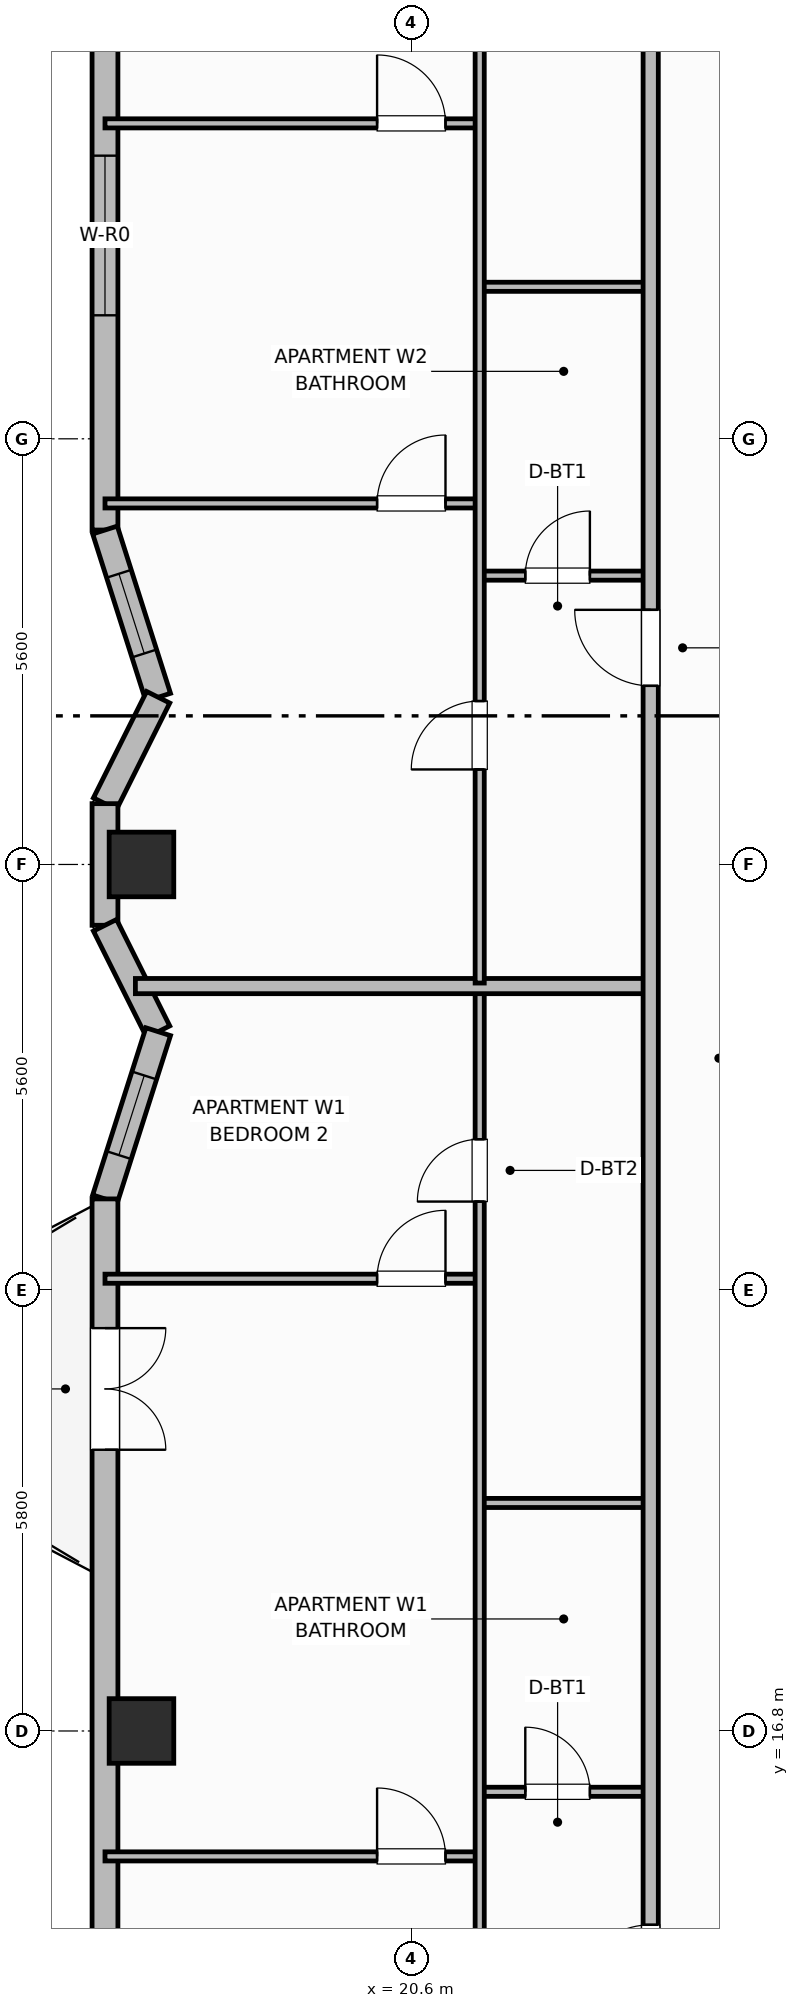
"""IFC4 building model, lengths in metres.
Left out: names, types, materials, properties, quantities, classifications, styles, units other than length and angle.
Written with IfcOpenShell. Run it as: python <this file> out.ifc"""

import sys

from ifc_helpers import new_model, si_unit, direction, frame, frame_2d, origin, origin_2d, place, context, subcontext, project, spatial, rectangle, extrude, element, fill, save


model = new_model("IFC4")
c1 = context("Model", 3, precision=1e-05, world=origin(), true_north=direction((0.0, 1.0)))
c2 = subcontext(c1, "Body", "Model", "MODEL_VIEW")
j1 = project(units=[si_unit("LENGTHUNIT", "METRE"), si_unit("PLANEANGLEUNIT", "RADIAN")], contexts=[c1])
p1 = place(None, origin())
s1 = spatial("IfcSite", under=j1, at=p1, CompositionType="ELEMENT")
p2 = place(p1, origin())
s2 = spatial("IfcBuilding", under=s1, at=p2, CompositionType="ELEMENT")
p3 = place(p2, frame((0.0, 0.0, 203.1)))
s3 = spatial("IfcBuildingStorey", under=s2, at=p3, CompositionType="ELEMENT", Elevation=203.1)
for number, where, z_axis, x_axis in (
    (1, (17.05, 16.8, 0.0), (0.0, 0.0, 1.0), (1.0, 0.0, 0.0)),
    (2, (17.05, 28.2, 0.0), (0.0, 0.0, 1.0), (1.0, 0.0, 0.0)),
):
    element("IfcColumn", number, at=place(p3, frame(where, z_axis=z_axis, x_axis=x_axis)), inside=s3, PredefinedType="COLUMN", context=c2, shape_type="SweptSolid", body=[
        extrude(rectangle(XDim=0.85, YDim=0.85, at=origin_2d()), origin(), (0.0, 0.0, 1.0), 4.2),
    ])
p4 = place(p3, frame((16.57, 41.05, 0.0), z_axis=(0.0, 0.0, 1.0), x_axis=(0.0, -1.0, 0.0)))
e3 = element("IfcWall", 3, at=p4, inside=s3, PredefinedType="SOLIDWALL", context=c2, shape_type="SweptSolid", body=[
    extrude(rectangle(XDim=8.45, YDim=0.34, at=frame_2d((4.225, 0.0))), origin(), (0.0, 0.0, 1.0), 3.22),
])
p5 = place(p4, frame((3.525, 0.0, 0.8)))
e4 = element("IfcOpeningElement", 4, at=p5, cuts=e3, PredefinedType="OPENING", context=c2, shape_type="SweptSolid", body=[
    extrude(rectangle(XDim=2.1, YDim=1.9, at=frame_2d((1.05, 0.95))), frame((0.0, 0.18, 0.0), z_axis=(0.0, -1.0, 0.0), x_axis=(1.0, 0.0, 0.0)), (0.0, 0.0, 1.0), 0.36),
])
p6 = place(p3, frame((16.57, 32.6, 0.0), z_axis=(0.0, 0.0, 1.0), x_axis=(0.303160011437, -0.952939666225, 0.0)))
e5 = element("IfcWall", 5, at=p6, inside=s3, PredefinedType="SOLIDWALL", context=c2, shape_type="SweptSolid", body=[
    extrude(rectangle(XDim=2.309, YDim=0.34, at=frame_2d((1.154, 0.0))), origin(), (0.0, 0.0, 1.0), 3.22),
])
p7 = place(p6, frame((0.604, 0.0, 0.95)))
e6 = element("IfcOpeningElement", 6, at=p7, cuts=e5, PredefinedType="OPENING", context=c2, shape_type="SweptSolid", body=[
    extrude(rectangle(XDim=1.1, YDim=1.65, at=frame_2d((0.55, 0.825))), frame((0.0, 0.18, 0.0), z_axis=(0.0, -1.0, 0.0), x_axis=(1.0, 0.0, 0.0)), (0.0, 0.0, 1.0), 0.36),
])
p8 = place(p3, frame((17.27, 30.4, 0.0), z_axis=(0.0, 0.0, 1.0), x_axis=(-0.4472135955, -0.894427191, 0.0)))
e7 = element("IfcWall", 7, at=p8, inside=s3, PredefinedType="SOLIDWALL", context=c2, shape_type="SweptSolid", body=[
    extrude(rectangle(XDim=1.565, YDim=0.34, at=frame_2d((0.783, 0.0))), origin(), (0.0, 0.0, 1.0), 3.22),
])
p9 = place(p3, frame((16.57, 29.0, 0.0), z_axis=(0.0, 0.0, 1.0), x_axis=(0.0, -1.0, 0.0)))
e8 = element("IfcWall", 8, at=p9, inside=s3, PredefinedType="SOLIDWALL", context=c2, shape_type="SweptSolid", body=[
    extrude(rectangle(XDim=1.6, YDim=0.34, at=frame_2d((0.8, 0.0))), origin(), (0.0, 0.0, 1.0), 3.22),
])
p10 = place(p3, frame((16.57, 27.4, 0.0), z_axis=(0.0, 0.0, 1.0), x_axis=(0.4472135955, -0.894427191, 0.0)))
e9 = element("IfcWall", 9, at=p10, inside=s3, PredefinedType="SOLIDWALL", context=c2, shape_type="SweptSolid", body=[
    extrude(rectangle(XDim=1.565, YDim=0.34, at=frame_2d((0.783, 0.0))), origin(), (0.0, 0.0, 1.0), 3.22),
])
p11 = place(p3, frame((17.27, 26.0, 0.0), z_axis=(0.0, 0.0, 1.0), x_axis=(-0.303190562272, -0.952929946507, 0.0)))
e10 = element("IfcWall", 10, at=p11, inside=s3, PredefinedType="SOLIDWALL", context=c2, shape_type="SweptSolid", body=[
    extrude(rectangle(XDim=2.309, YDim=0.34, at=frame_2d((1.154, 0.0))), origin(), (0.0, 0.0, 1.0), 3.22),
])
p12 = place(p11, frame((0.604, 0.0, 0.95)))
e11 = element("IfcOpeningElement", 11, at=p12, cuts=e10, PredefinedType="OPENING", context=c2, shape_type="SweptSolid", body=[
    extrude(rectangle(XDim=1.1, YDim=1.65, at=frame_2d((0.55, 0.825))), frame((0.0, 0.18, 0.0), z_axis=(0.0, -1.0, 0.0), x_axis=(1.0, 0.0, 0.0)), (0.0, 0.0, 1.0), 0.36),
])
p13 = place(p3, frame((16.57, 23.8, 0.0), z_axis=(0.0, 0.0, 1.0), x_axis=(0.0, -1.0, 0.0)))
e12 = element("IfcWall", 12, at=p13, inside=s3, PredefinedType="SOLIDWALL", context=c2, shape_type="SweptSolid", body=[
    extrude(rectangle(XDim=13.3, YDim=0.34, at=frame_2d((6.65, 0.0))), origin(), (0.0, 0.0, 1.0), 3.22),
])
p14 = place(p13, frame((1.7, 0.0, 0.0)))
e13 = element("IfcOpeningElement", 13, at=p14, cuts=e12, PredefinedType="OPENING", context=c2, shape_type="SweptSolid", body=[
    extrude(rectangle(XDim=1.6, YDim=2.1, at=frame_2d((0.8, 1.05))), frame((0.0, 0.18, 0.0), z_axis=(0.0, -1.0, 0.0), x_axis=(1.0, 0.0, 0.0)), (0.0, 0.0, 1.0), 0.36),
])
p15 = place(p13, frame((9.75, 0.0, 0.85)))
e14 = element("IfcOpeningElement", 14, at=p15, cuts=e12, PredefinedType="OPENING", context=c2, shape_type="SweptSolid", body=[
    extrude(rectangle(XDim=1.8, YDim=1.85, at=frame_2d((0.9, 0.925))), frame((0.0, 0.18, 0.0), z_axis=(0.0, -1.0, 0.0), x_axis=(1.0, 0.0, 0.0)), (0.0, 0.0, 1.0), 0.36),
])
p16 = place(p3, frame((21.5, 16.0, 0.0), z_axis=(0.0, 0.0, 1.0), x_axis=(1.0, 0.0, 0.0)))
e15 = element("IfcWall", 15, at=p16, inside=s3, PredefinedType="PARTITIONING", context=c2, shape_type="SweptSolid", body=[
    extrude(rectangle(XDim=2.25, YDim=0.12, at=frame_2d((1.125, 0.0))), origin(), (0.0, 0.0, 1.0), 3.05),
])
p17 = place(p16, frame((0.6, 0.0, 0.0)))
e16 = element("IfcOpeningElement", 16, at=p17, cuts=e15, PredefinedType="OPENING", context=c2, shape_type="SweptSolid", body=[
    extrude(rectangle(XDim=0.85, YDim=2.1, at=frame_2d((0.425, 1.05))), frame((0.0, 0.07, 0.0), z_axis=(0.0, -1.0, 0.0), x_axis=(1.0, 0.0, 0.0)), (0.0, 0.0, 1.0), 0.14),
])
p18 = place(p3, frame((21.5, 19.8, 0.0), z_axis=(0.0, 0.0, 1.0), x_axis=(1.0, 0.0, 0.0)))
e17 = element("IfcWall", 17, at=p18, inside=s3, PredefinedType="PARTITIONING", context=c2, shape_type="SweptSolid", body=[
    extrude(rectangle(XDim=2.25, YDim=0.12, at=frame_2d((1.125, 0.0))), origin(), (0.0, 0.0, 1.0), 3.05),
])
p19 = place(p3, frame((16.57, 15.15, 0.0), z_axis=(0.0, 0.0, 1.0), x_axis=(1.0, 0.0, 0.0)))
e18 = element("IfcWall", 18, at=p19, inside=s3, PredefinedType="PARTITIONING", context=c2, shape_type="SweptSolid", body=[
    extrude(rectangle(XDim=4.93, YDim=0.12, at=frame_2d((2.465, 0.0))), origin(), (0.0, 0.0, 1.0), 3.05),
])
p20 = place(p19, frame((3.58, 0.0, 0.0)))
e19 = element("IfcOpeningElement", 19, at=p20, cuts=e18, PredefinedType="OPENING", context=c2, shape_type="SweptSolid", body=[
    extrude(rectangle(XDim=0.9, YDim=2.1, at=frame_2d((0.45, 1.05))), frame((0.0, 0.07, 0.0), z_axis=(0.0, -1.0, 0.0), x_axis=(1.0, 0.0, 0.0)), (0.0, 0.0, 1.0), 0.14),
])
p21 = place(p3, frame((16.57, 22.75, 0.0), z_axis=(0.0, 0.0, 1.0), x_axis=(1.0, 0.0, 0.0)))
e20 = element("IfcWall", 20, at=p21, inside=s3, PredefinedType="PARTITIONING", context=c2, shape_type="SweptSolid", body=[
    extrude(rectangle(XDim=4.93, YDim=0.12, at=frame_2d((2.465, 0.0))), origin(), (0.0, 0.0, 1.0), 3.05),
])
p22 = place(p21, frame((3.58, 0.0, 0.0)))
e21 = element("IfcOpeningElement", 21, at=p22, cuts=e20, PredefinedType="OPENING", context=c2, shape_type="SweptSolid", body=[
    extrude(rectangle(XDim=0.9, YDim=2.1, at=frame_2d((0.45, 1.05))), frame((0.0, 0.07, 0.0), z_axis=(0.0, -1.0, 0.0), x_axis=(1.0, 0.0, 0.0)), (0.0, 0.0, 1.0), 0.14),
])
p23 = place(p3, frame((21.5, 10.64, 0.0), z_axis=(0.0, 0.0, 1.0), x_axis=(0.0, 1.0, 0.0)))
e22 = element("IfcWall", 22, at=p23, inside=s3, PredefinedType="PARTITIONING", context=c2, shape_type="SweptSolid", body=[
    extrude(rectangle(XDim=15.92, YDim=0.12, at=frame_2d((7.96, 0.0))), origin(), (0.0, 0.0, 1.0), 3.05),
])
p24 = place(p23, frame((0.41, 0.0, 0.0)))
e23 = element("IfcOpeningElement", 23, at=p24, cuts=e22, PredefinedType="OPENING", context=c2, shape_type="SweptSolid", body=[
    extrude(rectangle(XDim=0.9, YDim=2.1, at=frame_2d((0.45, 1.05))), frame((0.0, 0.07, 0.0), z_axis=(0.0, -1.0, 0.0), x_axis=(1.0, 0.0, 0.0)), (0.0, 0.0, 1.0), 0.14),
])
p25 = place(p23, frame((13.125, 0.0, 0.0)))
e24 = element("IfcOpeningElement", 24, at=p25, cuts=e22, PredefinedType="OPENING", context=c2, shape_type="SweptSolid", body=[
    extrude(rectangle(XDim=0.82, YDim=2.08, at=frame_2d((0.41, 1.04))), frame((0.0, 0.07, 0.0), z_axis=(0.0, -1.0, 0.0), x_axis=(1.0, 0.0, 0.0)), (0.0, 0.0, 1.0), 0.14),
])
p26 = place(p3, frame((16.97, 26.6, 0.0), z_axis=(0.0, 0.0, 1.0), x_axis=(1.0, 0.0, 0.0)))
e25 = element("IfcWall", 25, at=p26, inside=s3, PredefinedType="PARTITIONING", context=c2, shape_type="SweptSolid", body=[
    extrude(rectangle(XDim=6.78, YDim=0.2, at=frame_2d((3.39, 0.0))), origin(), (0.0, 0.0, 1.0), 3.05),
])
p27 = place(p3, frame((21.5, 32.0, 0.0), z_axis=(0.0, 0.0, 1.0), x_axis=(1.0, 0.0, 0.0)))
e26 = element("IfcWall", 26, at=p27, inside=s3, PredefinedType="PARTITIONING", context=c2, shape_type="SweptSolid", body=[
    extrude(rectangle(XDim=2.25, YDim=0.12, at=frame_2d((1.125, 0.0))), origin(), (0.0, 0.0, 1.0), 3.05),
])
p28 = place(p27, frame((0.6, 0.0, 0.0)))
e27 = element("IfcOpeningElement", 27, at=p28, cuts=e26, PredefinedType="OPENING", context=c2, shape_type="SweptSolid", body=[
    extrude(rectangle(XDim=0.85, YDim=2.1, at=frame_2d((0.425, 1.05))), frame((0.0, 0.07, 0.0), z_axis=(0.0, -1.0, 0.0), x_axis=(1.0, 0.0, 0.0)), (0.0, 0.0, 1.0), 0.14),
])
p29 = place(p3, frame((21.5, 35.8, 0.0), z_axis=(0.0, 0.0, 1.0), x_axis=(1.0, 0.0, 0.0)))
e28 = element("IfcWall", 28, at=p29, inside=s3, PredefinedType="PARTITIONING", context=c2, shape_type="SweptSolid", body=[
    extrude(rectangle(XDim=2.25, YDim=0.12, at=frame_2d((1.125, 0.0))), origin(), (0.0, 0.0, 1.0), 3.05),
])
p30 = place(p3, frame((16.57, 32.95, 0.0), z_axis=(0.0, 0.0, 1.0), x_axis=(1.0, 0.0, 0.0)))
e29 = element("IfcWall", 29, at=p30, inside=s3, PredefinedType="PARTITIONING", context=c2, shape_type="SweptSolid", body=[
    extrude(rectangle(XDim=4.93, YDim=0.12, at=frame_2d((2.465, 0.0))), origin(), (0.0, 0.0, 1.0), 3.05),
])
p31 = place(p30, frame((3.58, 0.0, 0.0)))
e30 = element("IfcOpeningElement", 30, at=p31, cuts=e29, PredefinedType="OPENING", context=c2, shape_type="SweptSolid", body=[
    extrude(rectangle(XDim=0.9, YDim=2.1, at=frame_2d((0.45, 1.05))), frame((0.0, 0.07, 0.0), z_axis=(0.0, -1.0, 0.0), x_axis=(1.0, 0.0, 0.0)), (0.0, 0.0, 1.0), 0.14),
])
p32 = place(p3, frame((16.57, 37.95, 0.0), z_axis=(0.0, 0.0, 1.0), x_axis=(1.0, 0.0, 0.0)))
e31 = element("IfcWall", 31, at=p32, inside=s3, PredefinedType="PARTITIONING", context=c2, shape_type="SweptSolid", body=[
    extrude(rectangle(XDim=4.93, YDim=0.12, at=frame_2d((2.465, 0.0))), origin(), (0.0, 0.0, 1.0), 3.05),
])
p33 = place(p32, frame((3.58, 0.0, 0.0)))
e32 = element("IfcOpeningElement", 32, at=p33, cuts=e31, PredefinedType="OPENING", context=c2, shape_type="SweptSolid", body=[
    extrude(rectangle(XDim=0.9, YDim=2.1, at=frame_2d((0.45, 1.05))), frame((0.0, 0.07, 0.0), z_axis=(0.0, -1.0, 0.0), x_axis=(1.0, 0.0, 0.0)), (0.0, 0.0, 1.0), 0.14),
])
p34 = place(p3, frame((21.5, 26.64, 0.0), z_axis=(0.0, 0.0, 1.0), x_axis=(0.0, 1.0, 0.0)))
e33 = element("IfcWall", 33, at=p34, inside=s3, PredefinedType="PARTITIONING", context=c2, shape_type="SweptSolid", body=[
    extrude(rectangle(XDim=19.12, YDim=0.12, at=frame_2d((9.56, 0.0))), origin(), (0.0, 0.0, 1.0), 3.05),
])
p35 = place(p34, frame((2.81, 0.0, 0.0)))
e34 = element("IfcOpeningElement", 34, at=p35, cuts=e33, PredefinedType="OPENING", context=c2, shape_type="SweptSolid", body=[
    extrude(rectangle(XDim=0.9, YDim=2.1, at=frame_2d((0.45, 1.05))), frame((0.0, 0.07, 0.0), z_axis=(0.0, -1.0, 0.0), x_axis=(1.0, 0.0, 0.0)), (0.0, 0.0, 1.0), 0.14),
])
p36 = place(p34, frame((15.365, 0.0, 0.0)))
e35 = element("IfcOpeningElement", 35, at=p36, cuts=e33, PredefinedType="OPENING", context=c2, shape_type="SweptSolid", body=[
    extrude(rectangle(XDim=0.82, YDim=2.08, at=frame_2d((0.41, 1.04))), frame((0.0, 0.07, 0.0), z_axis=(0.0, -1.0, 0.0), x_axis=(1.0, 0.0, 0.0)), (0.0, 0.0, 1.0), 0.14),
])
p37 = place(p3, frame((23.75, 10.6, 0.0), z_axis=(0.0, 0.0, 1.0), x_axis=(0.0, 1.0, 0.0)))
e36 = element("IfcWall", 36, at=p37, inside=s3, PredefinedType="PARTITIONING", context=c2, shape_type="SweptSolid", body=[
    extrude(rectangle(XDim=35.2, YDim=0.2, at=frame_2d((17.6, 0.0))), origin(), (0.0, 0.0, 1.0), 3.05),
])
p38 = place(p37, frame((2.65, 0.0, 0.0)))
e37 = element("IfcOpeningElement", 37, at=p38, cuts=e36, PredefinedType="OPENING", context=c2, shape_type="SweptSolid", body=[
    extrude(rectangle(XDim=1.0, YDim=2.15, at=frame_2d((0.5, 1.075))), frame((0.0, 0.11, 0.0), z_axis=(0.0, -1.0, 0.0), x_axis=(1.0, 0.0, 0.0)), (0.0, 0.0, 1.0), 0.22),
])
p39 = place(p37, frame((19.95, 0.0, 0.0)))
e38 = element("IfcOpeningElement", 38, at=p39, cuts=e36, PredefinedType="OPENING", context=c2, shape_type="SweptSolid", body=[
    extrude(rectangle(XDim=1.0, YDim=2.15, at=frame_2d((0.5, 1.075))), frame((0.0, 0.11, 0.0), z_axis=(0.0, -1.0, 0.0), x_axis=(1.0, 0.0, 0.0)), (0.0, 0.0, 1.0), 0.22),
])
p40 = place(p5, origin())
e39 = element("IfcWindow", 39, at=p40, inside=s3, PartitioningType="SINGLE_PANEL", PredefinedType="WINDOW", context=c2, shape_type="SweptSolid", body=[
    extrude(rectangle(XDim=2.1, YDim=1.9, at=frame_2d((1.05, 0.95))), frame((0.0, 0.03, 0.0), z_axis=(0.0, -1.0, 0.0), x_axis=(1.0, 0.0, 0.0)), (0.0, 0.0, 1.0), 0.06),
])
fill(e4, e39)
p41 = place(p7, origin())
e40 = element("IfcWindow", 40, at=p41, inside=s3, PartitioningType="SINGLE_PANEL", PredefinedType="WINDOW", context=c2, shape_type="SweptSolid", body=[
    extrude(rectangle(XDim=1.1, YDim=1.65, at=frame_2d((0.55, 0.825))), frame((0.0, 0.03, 0.0), z_axis=(0.0, -1.0, 0.0), x_axis=(1.0, 0.0, 0.0)), (0.0, 0.0, 1.0), 0.06),
])
fill(e6, e40)
p42 = place(p12, origin())
e41 = element("IfcWindow", 41, at=p42, inside=s3, PartitioningType="SINGLE_PANEL", PredefinedType="WINDOW", context=c2, shape_type="SweptSolid", body=[
    extrude(rectangle(XDim=1.1, YDim=1.65, at=frame_2d((0.55, 0.825))), frame((0.0, 0.03, 0.0), z_axis=(0.0, -1.0, 0.0), x_axis=(1.0, 0.0, 0.0)), (0.0, 0.0, 1.0), 0.06),
])
fill(e11, e41)
p43 = place(p14, origin())
e42 = element("IfcDoor", 42, at=p43, inside=s3, OperationType="DOUBLE_DOOR_SINGLE_SWING", PredefinedType="DOOR", context=c2, shape_type="SweptSolid", body=[
    extrude(rectangle(XDim=1.6, YDim=2.1, at=frame_2d((0.8, 1.05))), frame((0.0, 0.025, 0.0), z_axis=(0.0, -1.0, 0.0), x_axis=(1.0, 0.0, 0.0)), (0.0, 0.0, 1.0), 0.05),
])
fill(e13, e42)
p44 = place(p17, origin())
e43 = element("IfcDoor", 43, at=p44, inside=s3, OperationType="SINGLE_SWING_LEFT", PredefinedType="DOOR", context=c2, shape_type="SweptSolid", body=[
    extrude(rectangle(XDim=0.85, YDim=2.1, at=frame_2d((0.425, 1.05))), frame((0.0, 0.025, 0.0), z_axis=(0.0, -1.0, 0.0), x_axis=(1.0, 0.0, 0.0)), (0.0, 0.0, 1.0), 0.05),
])
fill(e16, e43)
p45 = place(p20, origin())
e44 = element("IfcDoor", 44, at=p45, inside=s3, OperationType="SINGLE_SWING_LEFT", PredefinedType="DOOR", context=c2, shape_type="SweptSolid", body=[
    extrude(rectangle(XDim=0.9, YDim=2.1, at=frame_2d((0.45, 1.05))), frame((0.0, 0.025, 0.0), z_axis=(0.0, -1.0, 0.0), x_axis=(1.0, 0.0, 0.0)), (0.0, 0.0, 1.0), 0.05),
])
fill(e19, e44)
p46 = place(p22, origin())
e45 = element("IfcDoor", 45, at=p46, inside=s3, OperationType="SINGLE_SWING_RIGHT", PredefinedType="DOOR", context=c2, shape_type="SweptSolid", body=[
    extrude(rectangle(XDim=0.9, YDim=2.1, at=frame_2d((0.45, 1.05))), frame((0.0, 0.025, 0.0), z_axis=(0.0, -1.0, 0.0), x_axis=(1.0, 0.0, 0.0)), (0.0, 0.0, 1.0), 0.05),
])
fill(e21, e45)
p47 = place(p25, origin())
e46 = element("IfcDoor", 46, at=p47, inside=s3, OperationType="SINGLE_SWING_LEFT", PredefinedType="DOOR", context=c2, shape_type="SweptSolid", body=[
    extrude(rectangle(XDim=0.82, YDim=2.08, at=frame_2d((0.41, 1.04))), frame((0.0, 0.025, 0.0), z_axis=(0.0, -1.0, 0.0), x_axis=(1.0, 0.0, 0.0)), (0.0, 0.0, 1.0), 0.05),
])
fill(e24, e46)
p48 = place(p28, origin())
e47 = element("IfcDoor", 47, at=p48, inside=s3, OperationType="SINGLE_SWING_RIGHT", PredefinedType="DOOR", context=c2, shape_type="SweptSolid", body=[
    extrude(rectangle(XDim=0.85, YDim=2.1, at=frame_2d((0.425, 1.05))), frame((0.0, 0.025, 0.0), z_axis=(0.0, -1.0, 0.0), x_axis=(1.0, 0.0, 0.0)), (0.0, 0.0, 1.0), 0.05),
])
fill(e27, e47)
p49 = place(p31, origin())
e48 = element("IfcDoor", 48, at=p49, inside=s3, OperationType="SINGLE_SWING_RIGHT", PredefinedType="DOOR", context=c2, shape_type="SweptSolid", body=[
    extrude(rectangle(XDim=0.9, YDim=2.1, at=frame_2d((0.45, 1.05))), frame((0.0, 0.025, 0.0), z_axis=(0.0, -1.0, 0.0), x_axis=(1.0, 0.0, 0.0)), (0.0, 0.0, 1.0), 0.05),
])
fill(e30, e48)
p50 = place(p33, origin())
e49 = element("IfcDoor", 49, at=p50, inside=s3, OperationType="SINGLE_SWING_LEFT", PredefinedType="DOOR", context=c2, shape_type="SweptSolid", body=[
    extrude(rectangle(XDim=0.9, YDim=2.1, at=frame_2d((0.45, 1.05))), frame((0.0, 0.025, 0.0), z_axis=(0.0, -1.0, 0.0), x_axis=(1.0, 0.0, 0.0)), (0.0, 0.0, 1.0), 0.05),
])
fill(e32, e49)
p51 = place(p35, origin())
e50 = element("IfcDoor", 50, at=p51, inside=s3, OperationType="SINGLE_SWING_LEFT", PredefinedType="DOOR", context=c2, shape_type="SweptSolid", body=[
    extrude(rectangle(XDim=0.9, YDim=2.1, at=frame_2d((0.45, 1.05))), frame((0.0, 0.025, 0.0), z_axis=(0.0, -1.0, 0.0), x_axis=(1.0, 0.0, 0.0)), (0.0, 0.0, 1.0), 0.05),
])
fill(e34, e50)
p52 = place(p38, origin())
e51 = element("IfcDoor", 51, at=p52, inside=s3, OperationType="SINGLE_SWING_LEFT", PredefinedType="DOOR", context=c2, shape_type="SweptSolid", body=[
    extrude(rectangle(XDim=1.0, YDim=2.15, at=frame_2d((0.5, 1.075))), frame((0.0, 0.025, 0.0), z_axis=(0.0, -1.0, 0.0), x_axis=(1.0, 0.0, 0.0)), (0.0, 0.0, 1.0), 0.05),
])
fill(e37, e51)
p53 = place(p39, origin())
e52 = element("IfcDoor", 52, at=p53, inside=s3, OperationType="SINGLE_SWING_RIGHT", PredefinedType="DOOR", context=c2, shape_type="SweptSolid", body=[
    extrude(rectangle(XDim=1.0, YDim=2.15, at=frame_2d((0.5, 1.075))), frame((0.0, 0.025, 0.0), z_axis=(0.0, -1.0, 0.0), x_axis=(1.0, 0.0, 0.0)), (0.0, 0.0, 1.0), 0.05),
])
fill(e38, e52)
save(model, sys.argv[1])
